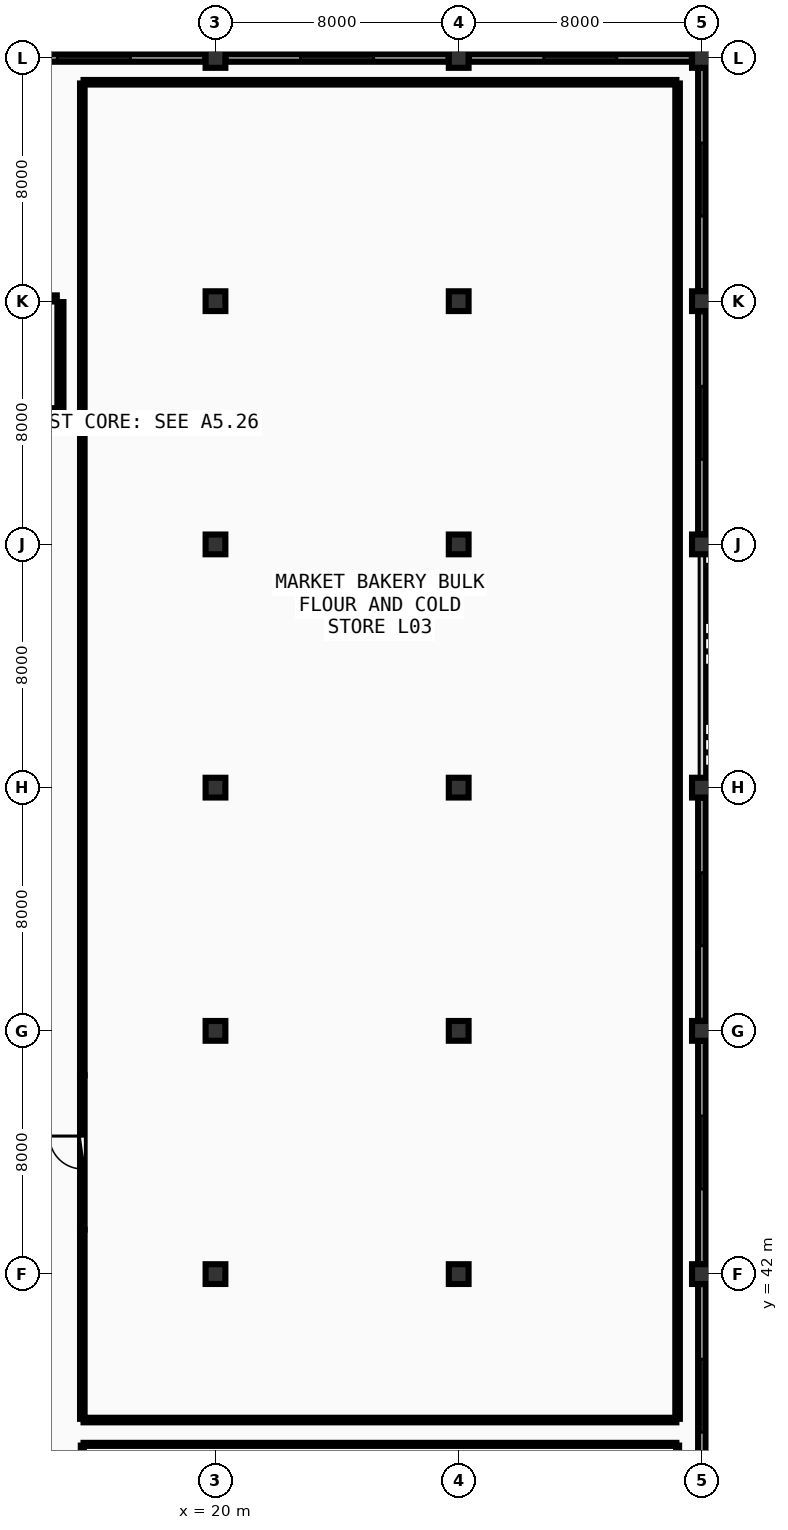
"""IFC4 building model, lengths in metres.
Left out: names, types, materials, properties, quantities, classifications, styles, units other than length and angle.
Written with IfcOpenShell. Run it as: python <this file> out.ifc"""

import sys

from ifc_helpers import new_model, si_unit, direction, frame, frame_2d, origin, origin_2d, place, context, subcontext, project, spatial, rectangle, extrude, element, fill, save


model = new_model("IFC4")
c1 = context("Model", 3, precision=1e-05, world=origin(), true_north=direction((0.0, 1.0)))
c2 = subcontext(c1, "Body", "Model", "MODEL_VIEW")
j1 = project(units=[si_unit("LENGTHUNIT", "METRE"), si_unit("PLANEANGLEUNIT", "RADIAN")], contexts=[c1])
p1 = place(None, origin())
s1 = spatial("IfcSite", under=j1, at=p1, CompositionType="ELEMENT")
p2 = place(p1, origin())
s2 = spatial("IfcBuilding", under=s1, at=p2, CompositionType="ELEMENT")
p3 = place(p2, frame((0.0, 0.0, 13.5)))
s3 = spatial("IfcBuildingStorey", under=s2, at=p3, CompositionType="ELEMENT", Elevation=13.5)
for number, where, z_axis, x_axis in (
    (1, (20.0, 42.0, 0.0), (0.0, 0.0, 1.0), (1.0, 0.0, 0.0)),
    (2, (20.0, 50.0, 0.0), (0.0, 0.0, 1.0), (1.0, 0.0, 0.0)),
    (3, (20.0, 58.0, 0.0), (0.0, 0.0, 1.0), (1.0, 0.0, 0.0)),
    (4, (20.0, 66.0, 0.0), (0.0, 0.0, 1.0), (1.0, 0.0, 0.0)),
    (5, (20.0, 74.0, 0.0), (0.0, 0.0, 1.0), (1.0, 0.0, 0.0)),
    (6, (20.0, 82.0, 0.0), (0.0, 0.0, 1.0), (1.0, 0.0, 0.0)),
    (7, (28.0, 42.0, 0.0), (0.0, 0.0, 1.0), (1.0, 0.0, 0.0)),
    (8, (28.0, 50.0, 0.0), (0.0, 0.0, 1.0), (1.0, 0.0, 0.0)),
    (9, (28.0, 58.0, 0.0), (0.0, 0.0, 1.0), (1.0, 0.0, 0.0)),
    (10, (28.0, 66.0, 0.0), (0.0, 0.0, 1.0), (1.0, 0.0, 0.0)),
    (11, (28.0, 74.0, 0.0), (0.0, 0.0, 1.0), (1.0, 0.0, 0.0)),
    (12, (28.0, 82.0, 0.0), (0.0, 0.0, 1.0), (1.0, 0.0, 0.0)),
    (13, (36.0, 42.0, 0.0), (0.0, 0.0, 1.0), (1.0, 0.0, 0.0)),
    (14, (36.0, 50.0, 0.0), (0.0, 0.0, 1.0), (1.0, 0.0, 0.0)),
    (15, (36.0, 58.0, 0.0), (0.0, 0.0, 1.0), (1.0, 0.0, 0.0)),
    (16, (36.0, 66.0, 0.0), (0.0, 0.0, 1.0), (1.0, 0.0, 0.0)),
    (17, (36.0, 74.0, 0.0), (0.0, 0.0, 1.0), (1.0, 0.0, 0.0)),
    (18, (36.0, 82.0, 0.0), (0.0, 0.0, 1.0), (1.0, 0.0, 0.0)),
):
    element("IfcColumn", number, at=place(p3, frame(where, z_axis=z_axis, x_axis=x_axis)), inside=s3, PredefinedType="COLUMN", context=c2, shape_type="SweptSolid", body=[
        extrude(rectangle(XDim=0.65, YDim=0.65, at=origin_2d()), origin(), (0.0, 0.0, 1.0), 4.5),
    ])
p4 = place(p3, frame((36.0, 34.33, 0.0), z_axis=(0.0, 0.0, 1.0), x_axis=(0.0, 1.0, 0.0)))
e19 = element("IfcWall", 19, at=p4, inside=s3, PredefinedType="SOLIDWALL", context=c2, shape_type="SweptSolid", body=[
    extrude(rectangle(XDim=7.34, YDim=0.25, at=frame_2d((3.67, 0.0))), origin(), (0.0, 0.0, 1.0), 3.42),
])
p5 = place(p4, frame((2.47, 0.0, 0.95)))
e20 = element("IfcOpeningElement", 20, at=p5, cuts=e19, PredefinedType="OPENING", context=c2, shape_type="SweptSolid", body=[
    extrude(rectangle(XDim=2.4, YDim=1.65, at=frame_2d((1.2, 0.825))), frame((0.0, 0.135, 0.0), z_axis=(0.0, -1.0, 0.0), x_axis=(1.0, 0.0, 0.0)), (0.0, 0.0, 1.0), 0.27),
])
p6 = place(p3, frame((36.0, 42.33, 0.0), z_axis=(0.0, 0.0, 1.0), x_axis=(0.0, 1.0, 0.0)))
e21 = element("IfcWall", 21, at=p6, inside=s3, PredefinedType="SOLIDWALL", context=c2, shape_type="SweptSolid", body=[
    extrude(rectangle(XDim=7.34, YDim=0.25, at=frame_2d((3.67, 0.0))), origin(), (0.0, 0.0, 1.0), 3.42),
])
p7 = place(p6, frame((2.47, 0.0, 0.95)))
e22 = element("IfcOpeningElement", 22, at=p7, cuts=e21, PredefinedType="OPENING", context=c2, shape_type="SweptSolid", body=[
    extrude(rectangle(XDim=2.4, YDim=1.65, at=frame_2d((1.2, 0.825))), frame((0.0, 0.135, 0.0), z_axis=(0.0, -1.0, 0.0), x_axis=(1.0, 0.0, 0.0)), (0.0, 0.0, 1.0), 0.27),
])
p8 = place(p3, frame((36.0, 50.33, 0.0), z_axis=(0.0, 0.0, 1.0), x_axis=(0.0, 1.0, 0.0)))
e23 = element("IfcWall", 23, at=p8, inside=s3, PredefinedType="SOLIDWALL", context=c2, shape_type="SweptSolid", body=[
    extrude(rectangle(XDim=7.34, YDim=0.25, at=frame_2d((3.67, 0.0))), origin(), (0.0, 0.0, 1.0), 3.42),
])
p9 = place(p8, frame((2.47, 0.0, 0.95)))
e24 = element("IfcOpeningElement", 24, at=p9, cuts=e23, PredefinedType="OPENING", context=c2, shape_type="SweptSolid", body=[
    extrude(rectangle(XDim=2.4, YDim=1.65, at=frame_2d((1.2, 0.825))), frame((0.0, 0.135, 0.0), z_axis=(0.0, -1.0, 0.0), x_axis=(1.0, 0.0, 0.0)), (0.0, 0.0, 1.0), 0.27),
])
p10 = place(p3, frame((36.0, 66.33, 0.0), z_axis=(0.0, 0.0, 1.0), x_axis=(0.0, 1.0, 0.0)))
e25 = element("IfcWall", 25, at=p10, inside=s3, PredefinedType="SOLIDWALL", context=c2, shape_type="SweptSolid", body=[
    extrude(rectangle(XDim=7.34, YDim=0.25, at=frame_2d((3.67, 0.0))), origin(), (0.0, 0.0, 1.0), 3.42),
])
p11 = place(p10, frame((2.47, 0.0, 0.95)))
e26 = element("IfcOpeningElement", 26, at=p11, cuts=e25, PredefinedType="OPENING", context=c2, shape_type="SweptSolid", body=[
    extrude(rectangle(XDim=2.4, YDim=1.65, at=frame_2d((1.2, 0.825))), frame((0.0, 0.135, 0.0), z_axis=(0.0, -1.0, 0.0), x_axis=(1.0, 0.0, 0.0)), (0.0, 0.0, 1.0), 0.27),
])
p12 = place(p3, frame((36.0, 74.33, 0.0), z_axis=(0.0, 0.0, 1.0), x_axis=(0.0, 1.0, 0.0)))
e27 = element("IfcWall", 27, at=p12, inside=s3, PredefinedType="SOLIDWALL", context=c2, shape_type="SweptSolid", body=[
    extrude(rectangle(XDim=7.34, YDim=0.25, at=frame_2d((3.67, 0.0))), origin(), (0.0, 0.0, 1.0), 3.42),
])
p13 = place(p12, frame((2.47, 0.0, 0.95)))
e28 = element("IfcOpeningElement", 28, at=p13, cuts=e27, PredefinedType="OPENING", context=c2, shape_type="SweptSolid", body=[
    extrude(rectangle(XDim=2.4, YDim=1.65, at=frame_2d((1.2, 0.825))), frame((0.0, 0.135, 0.0), z_axis=(0.0, -1.0, 0.0), x_axis=(1.0, 0.0, 0.0)), (0.0, 0.0, 1.0), 0.27),
])
p14 = place(p3, frame((35.67, 82.0, 0.0), z_axis=(0.0, 0.0, 1.0), x_axis=(-1.0, 0.0, 0.0)))
e29 = element("IfcWall", 29, at=p14, inside=s3, PredefinedType="SOLIDWALL", context=c2, shape_type="SweptSolid", body=[
    extrude(rectangle(XDim=7.34, YDim=0.25, at=frame_2d((3.67, 0.0))), origin(), (0.0, 0.0, 1.0), 3.42),
])
p15 = place(p14, frame((2.47, 0.0, 0.95)))
e30 = element("IfcOpeningElement", 30, at=p15, cuts=e29, PredefinedType="OPENING", context=c2, shape_type="SweptSolid", body=[
    extrude(rectangle(XDim=2.4, YDim=1.65, at=frame_2d((1.2, 0.825))), frame((0.0, 0.135, 0.0), z_axis=(0.0, -1.0, 0.0), x_axis=(1.0, 0.0, 0.0)), (0.0, 0.0, 1.0), 0.27),
])
p16 = place(p3, frame((27.67, 82.0, 0.0), z_axis=(0.0, 0.0, 1.0), x_axis=(-1.0, 0.0, 0.0)))
e31 = element("IfcWall", 31, at=p16, inside=s3, PredefinedType="SOLIDWALL", context=c2, shape_type="SweptSolid", body=[
    extrude(rectangle(XDim=7.34, YDim=0.25, at=frame_2d((3.67, 0.0))), origin(), (0.0, 0.0, 1.0), 3.42),
])
p17 = place(p16, frame((2.47, 0.0, 0.95)))
e32 = element("IfcOpeningElement", 32, at=p17, cuts=e31, PredefinedType="OPENING", context=c2, shape_type="SweptSolid", body=[
    extrude(rectangle(XDim=2.4, YDim=1.65, at=frame_2d((1.2, 0.825))), frame((0.0, 0.135, 0.0), z_axis=(0.0, -1.0, 0.0), x_axis=(1.0, 0.0, 0.0)), (0.0, 0.0, 1.0), 0.27),
])
p18 = place(p3, frame((19.67, 82.0, 0.0), z_axis=(0.0, 0.0, 1.0), x_axis=(-1.0, 0.0, 0.0)))
e33 = element("IfcWall", 33, at=p18, inside=s3, PredefinedType="SOLIDWALL", context=c2, shape_type="SweptSolid", body=[
    extrude(rectangle(XDim=7.34, YDim=0.25, at=frame_2d((3.67, 0.0))), origin(), (0.0, 0.0, 1.0), 3.42),
])
p19 = place(p18, frame((2.47, 0.0, 0.95)))
e34 = element("IfcOpeningElement", 34, at=p19, cuts=e33, PredefinedType="OPENING", context=c2, shape_type="SweptSolid", body=[
    extrude(rectangle(XDim=2.4, YDim=1.65, at=frame_2d((1.2, 0.825))), frame((0.0, 0.135, 0.0), z_axis=(0.0, -1.0, 0.0), x_axis=(1.0, 0.0, 0.0)), (0.0, 0.0, 1.0), 0.27),
])
p20 = place(p3, frame((7.02, 70.38, 0.0), z_axis=(0.0, 0.0, 1.0), x_axis=(1.0, 0.0, 0.0)))
e35 = element("IfcWall", 35, at=p20, inside=s3, PredefinedType="SHEAR", context=c2, shape_type="SweptSolid", body=[
    extrude(rectangle(XDim=7.76, YDim=0.2, at=frame_2d((3.88, 0.0))), origin(), (0.0, 0.0, 1.0), 4.24),
])
p21 = place(p20, frame((0.2, 0.0, 0.0)))
e36 = element("IfcOpeningElement", 36, at=p21, cuts=e35, PredefinedType="OPENING", context=c2, shape_type="SweptSolid", body=[
    extrude(rectangle(XDim=1.05, YDim=2.1, at=frame_2d((0.525, 1.05))), frame((0.0, 0.11, 0.0), z_axis=(0.0, -1.0, 0.0), x_axis=(1.0, 0.0, 0.0)), (0.0, 0.0, 1.0), 0.22),
])
p22 = place(p3, frame((14.9, 70.5, 0.0), z_axis=(0.0, 0.0, 1.0), x_axis=(0.0, 1.0, 0.0)))
e37 = element("IfcWall", 37, at=p22, inside=s3, PredefinedType="SHEAR", context=c2, shape_type="SweptSolid", body=[
    extrude(rectangle(XDim=3.47, YDim=0.2, at=frame_2d((1.735, 0.0))), origin(), (0.0, 0.0, 1.0), 4.24),
])
p23 = place(p3, frame((14.78, 74.09, 0.0), z_axis=(0.0, 0.0, 1.0), x_axis=(-1.0, 0.0, 0.0)))
e38 = element("IfcWall", 38, at=p23, inside=s3, PredefinedType="SHEAR", context=c2, shape_type="SweptSolid", body=[
    extrude(rectangle(XDim=7.76, YDim=0.2, at=frame_2d((3.88, 0.0))), origin(), (0.0, 0.0, 1.0), 4.24),
])
p24 = place(p3, frame((15.62, 43.46, 0.0), z_axis=(0.0, 0.0, 1.0), x_axis=(0.0, 1.0, 0.0)))
e39 = element("IfcWall", 39, at=p24, inside=s3, PredefinedType="PARTITIONING", context=c2, shape_type="SweptSolid", body=[
    extrude(rectangle(XDim=5.08, YDim=0.15, at=frame_2d((2.54, 0.0))), origin(), (0.0, 0.0, 1.0), 4.09),
])
p25 = place(p24, frame((2.0, 0.0, 0.0)))
e40 = element("IfcOpeningElement", 40, at=p25, cuts=e39, PredefinedType="OPENING", context=c2, shape_type="SweptSolid", body=[
    extrude(rectangle(XDim=1.08, YDim=2.1, at=frame_2d((0.54, 1.05))), frame((0.0, 0.085, 0.0), z_axis=(0.0, -1.0, 0.0), x_axis=(1.0, 0.0, 0.0)), (0.0, 0.0, 1.0), 0.17),
])
p26 = place(p3, frame((35.2, 27.64, 0.0), z_axis=(0.0, 0.0, 1.0), x_axis=(0.0, 1.0, 0.0)))
e41 = element("IfcWall", 41, at=p26, inside=s3, PredefinedType="PARTITIONING", context=c2, shape_type="SweptSolid", body=[
    extrude(rectangle(XDim=8.72, YDim=0.1, at=frame_2d((4.36, 0.0))), origin(), (0.0, 0.0, 1.0), 3.425),
])
p27 = place(p3, frame((35.16, 36.4, 0.0), z_axis=(0.0, 0.0, 1.0), x_axis=(-1.0, 0.0, 0.0)))
e42 = element("IfcWall", 42, at=p27, inside=s3, PredefinedType="PARTITIONING", context=c2, shape_type="SweptSolid", body=[
    extrude(rectangle(XDim=19.5, YDim=0.1, at=frame_2d((9.75, 0.0))), origin(), (0.0, 0.0, 1.0), 3.425),
])
p28 = place(p3, frame((15.62, 36.36, 0.0), z_axis=(0.0, 0.0, 1.0), x_axis=(0.0, -1.0, 0.0)))
e43 = element("IfcWall", 43, at=p28, inside=s3, PredefinedType="PARTITIONING", context=c2, shape_type="SweptSolid", body=[
    extrude(rectangle(XDim=3.82, YDim=0.1, at=frame_2d((1.91, 0.0))), origin(), (0.0, 0.0, 1.0), 3.425),
])
p29 = place(p3, frame((15.66, 37.2, 0.0), z_axis=(0.0, 0.0, 1.0), x_axis=(1.0, 0.0, 0.0)))
e44 = element("IfcWall", 44, at=p29, inside=s3, PredefinedType="PARTITIONING", context=c2, shape_type="SweptSolid", body=[
    extrude(rectangle(XDim=19.5, YDim=0.15, at=frame_2d((9.75, 0.0))), origin(), (0.0, 0.0, 1.0), 3.425),
])
p30 = place(p3, frame((35.2, 37.24, 0.0), z_axis=(0.0, 0.0, 1.0), x_axis=(0.0, 1.0, 0.0)))
e45 = element("IfcWall", 45, at=p30, inside=s3, PredefinedType="PARTITIONING", context=c2, shape_type="SweptSolid", body=[
    extrude(rectangle(XDim=43.92, YDim=0.15, at=frame_2d((21.96, 0.0))), origin(), (0.0, 0.0, 1.0), 3.425),
])
p31 = place(p3, frame((35.16, 81.2, 0.0), z_axis=(0.0, 0.0, 1.0), x_axis=(-1.0, 0.0, 0.0)))
e46 = element("IfcWall", 46, at=p31, inside=s3, PredefinedType="PARTITIONING", context=c2, shape_type="SweptSolid", body=[
    extrude(rectangle(XDim=19.5, YDim=0.15, at=frame_2d((9.75, 0.0))), origin(), (0.0, 0.0, 1.0), 3.425),
])
p32 = place(p3, frame((15.62, 81.16, 0.0), z_axis=(0.0, 0.0, 1.0), x_axis=(0.0, -1.0, 0.0)))
e47 = element("IfcWall", 47, at=p32, inside=s3, PredefinedType="PARTITIONING", context=c2, shape_type="SweptSolid", body=[
    extrude(rectangle(XDim=32.62, YDim=0.15, at=frame_2d((16.31, 0.0))), origin(), (0.0, 0.0, 1.0), 3.425),
])
p33 = place(p3, frame((15.62, 43.46, 0.0), z_axis=(0.0, 0.0, 1.0), x_axis=(0.0, -1.0, 0.0)))
e48 = element("IfcWall", 48, at=p33, inside=s3, PredefinedType="PARTITIONING", context=c2, shape_type="SweptSolid", body=[
    extrude(rectangle(XDim=6.22, YDim=0.15, at=frame_2d((3.11, 0.0))), origin(), (0.0, 0.0, 1.0), 3.425),
])
p34 = place(p5, origin())
e49 = element("IfcWindow", 49, at=p34, inside=s3, PartitioningType="SINGLE_PANEL", PredefinedType="WINDOW", context=c2, shape_type="SweptSolid", body=[
    extrude(rectangle(XDim=2.4, YDim=1.65, at=frame_2d((1.2, 0.825))), frame((0.0, 0.03, 0.0), z_axis=(0.0, -1.0, 0.0), x_axis=(1.0, 0.0, 0.0)), (0.0, 0.0, 1.0), 0.06),
])
fill(e20, e49)
p35 = place(p7, origin())
e50 = element("IfcWindow", 50, at=p35, inside=s3, PartitioningType="SINGLE_PANEL", PredefinedType="WINDOW", context=c2, shape_type="SweptSolid", body=[
    extrude(rectangle(XDim=2.4, YDim=1.65, at=frame_2d((1.2, 0.825))), frame((0.0, 0.03, 0.0), z_axis=(0.0, -1.0, 0.0), x_axis=(1.0, 0.0, 0.0)), (0.0, 0.0, 1.0), 0.06),
])
fill(e22, e50)
p36 = place(p9, origin())
e51 = element("IfcWindow", 51, at=p36, inside=s3, PartitioningType="SINGLE_PANEL", PredefinedType="WINDOW", context=c2, shape_type="SweptSolid", body=[
    extrude(rectangle(XDim=2.4, YDim=1.65, at=frame_2d((1.2, 0.825))), frame((0.0, 0.03, 0.0), z_axis=(0.0, -1.0, 0.0), x_axis=(1.0, 0.0, 0.0)), (0.0, 0.0, 1.0), 0.06),
])
fill(e24, e51)
p37 = place(p11, origin())
e52 = element("IfcWindow", 52, at=p37, inside=s3, PartitioningType="SINGLE_PANEL", PredefinedType="WINDOW", context=c2, shape_type="SweptSolid", body=[
    extrude(rectangle(XDim=2.4, YDim=1.65, at=frame_2d((1.2, 0.825))), frame((0.0, 0.03, 0.0), z_axis=(0.0, -1.0, 0.0), x_axis=(1.0, 0.0, 0.0)), (0.0, 0.0, 1.0), 0.06),
])
fill(e26, e52)
p38 = place(p13, origin())
e53 = element("IfcWindow", 53, at=p38, inside=s3, PartitioningType="SINGLE_PANEL", PredefinedType="WINDOW", context=c2, shape_type="SweptSolid", body=[
    extrude(rectangle(XDim=2.4, YDim=1.65, at=frame_2d((1.2, 0.825))), frame((0.0, 0.03, 0.0), z_axis=(0.0, -1.0, 0.0), x_axis=(1.0, 0.0, 0.0)), (0.0, 0.0, 1.0), 0.06),
])
fill(e28, e53)
p39 = place(p15, origin())
e54 = element("IfcWindow", 54, at=p39, inside=s3, PartitioningType="SINGLE_PANEL", PredefinedType="WINDOW", context=c2, shape_type="SweptSolid", body=[
    extrude(rectangle(XDim=2.4, YDim=1.65, at=frame_2d((1.2, 0.825))), frame((0.0, 0.03, 0.0), z_axis=(0.0, -1.0, 0.0), x_axis=(1.0, 0.0, 0.0)), (0.0, 0.0, 1.0), 0.06),
])
fill(e30, e54)
p40 = place(p17, origin())
e55 = element("IfcWindow", 55, at=p40, inside=s3, PartitioningType="SINGLE_PANEL", PredefinedType="WINDOW", context=c2, shape_type="SweptSolid", body=[
    extrude(rectangle(XDim=2.4, YDim=1.65, at=frame_2d((1.2, 0.825))), frame((0.0, 0.03, 0.0), z_axis=(0.0, -1.0, 0.0), x_axis=(1.0, 0.0, 0.0)), (0.0, 0.0, 1.0), 0.06),
])
fill(e32, e55)
p41 = place(p19, origin())
e56 = element("IfcWindow", 56, at=p41, inside=s3, PartitioningType="SINGLE_PANEL", PredefinedType="WINDOW", context=c2, shape_type="SweptSolid", body=[
    extrude(rectangle(XDim=2.4, YDim=1.65, at=frame_2d((1.2, 0.825))), frame((0.0, 0.03, 0.0), z_axis=(0.0, -1.0, 0.0), x_axis=(1.0, 0.0, 0.0)), (0.0, 0.0, 1.0), 0.06),
])
fill(e34, e56)
p42 = place(p25, origin())
e57 = element("IfcDoor", 57, at=p42, inside=s3, OperationType="SINGLE_SWING_RIGHT", PredefinedType="DOOR", context=c2, shape_type="SweptSolid", body=[
    extrude(rectangle(XDim=1.08, YDim=2.1, at=frame_2d((0.54, 1.05))), frame((0.0, 0.025, 0.0), z_axis=(0.0, -1.0, 0.0), x_axis=(1.0, 0.0, 0.0)), (0.0, 0.0, 1.0), 0.05),
])
fill(e40, e57)
save(model, sys.argv[1])
